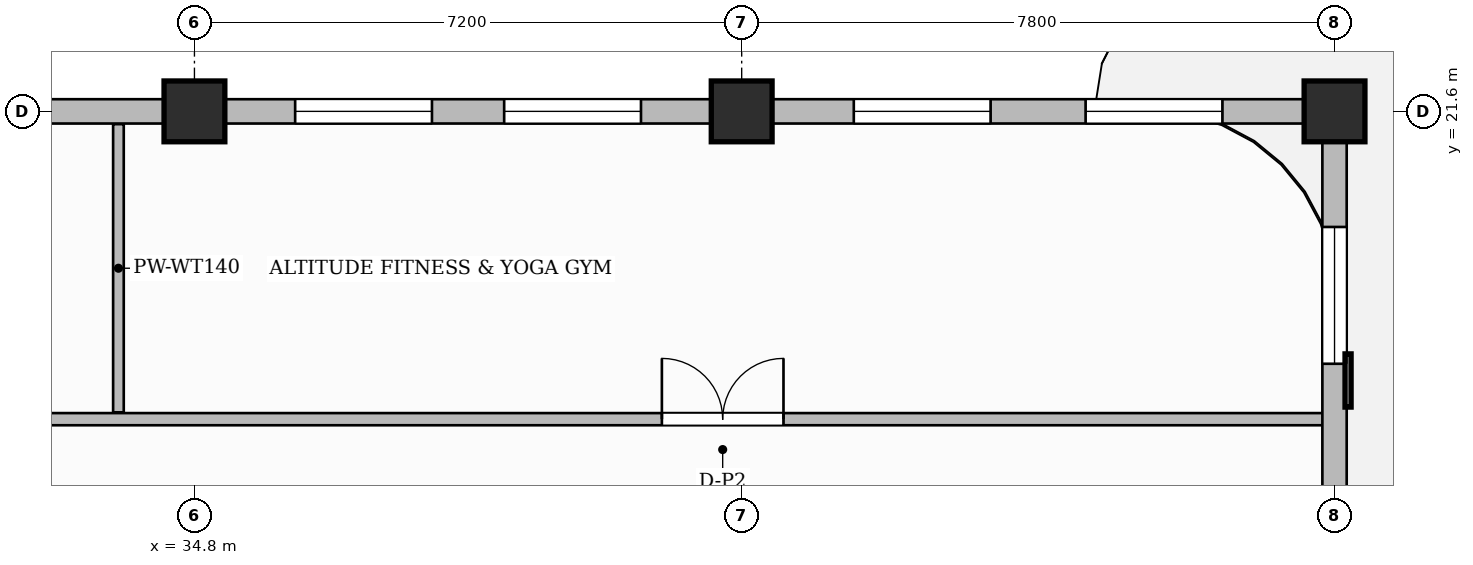
"""IFC4 building model, lengths in metres.
Left out: names, types, materials, properties, quantities, classifications, styles, units other than length and angle.
Written with IfcOpenShell. Run it as: python <this file> out.ifc"""

import sys

from ifc_helpers import new_model, si_unit, direction, frame, frame_2d, origin, origin_2d, place, context, subcontext, project, spatial, rectangle, extrude, source, transform, mapped, element, fill, save


model = new_model("IFC4")
c1 = context("Model", 3, precision=1e-05, world=origin(), true_north=direction((0.0, 1.0)))
c2 = subcontext(c1, "Body", "Model", "MODEL_VIEW")
j1 = project(units=[si_unit("LENGTHUNIT", "METRE"), si_unit("PLANEANGLEUNIT", "RADIAN")], contexts=[c1])
p1 = place(None, origin())
s1 = spatial("IfcSite", under=j1, at=p1, CompositionType="ELEMENT")
p2 = place(p1, origin())
s2 = spatial("IfcBuilding", under=s1, at=p2, CompositionType="ELEMENT")
p3 = place(p2, frame((0.0, 0.0, 271.2)))
s3 = spatial("IfcBuildingStorey", under=s2, at=p3, CompositionType="ELEMENT", Elevation=271.2)
m1 = source(origin(), c2, "Body", "SweptSolid", [
    extrude(rectangle(XDim=0.8, YDim=0.8, at=origin_2d()), origin(), (0.0, 0.0, 1.0), 3.85),
])
for number, where, z_axis, x_axis in (
    (1, (34.8, 21.6, 0.0), (0.0, 0.0, 1.0), (1.0, 0.0, 0.0)),
    (2, (42.0, 21.6, 0.0), (0.0, 0.0, 1.0), (1.0, 0.0, 0.0)),
    (3, (49.8, 21.6, 0.0), (0.0, 0.0, 1.0), (1.0, 0.0, 0.0)),
):
    element("IfcColumn", number, at=place(p3, frame(where, z_axis=z_axis, x_axis=x_axis)), inside=s3, PredefinedType="COLUMN", context=c2, shape_type="MappedRepresentation", body=[
        mapped(m1, transform((0.0, 0.0, 0.0), scale=1.0)),
    ])
p4 = place(p3, frame((30.29, 17.55, 0.0), z_axis=(0.0, 0.0, 1.0), x_axis=(1.0, 0.0, 0.0)))
e4 = element("IfcWall", 4, at=p4, inside=s3, PredefinedType="PARTITIONING", context=c2, shape_type="SweptSolid", body=[
    extrude(rectangle(XDim=19.37, YDim=0.16, at=frame_2d((9.685, 0.0))), origin(), (0.0, 0.0, 1.0), 3.6),
])
p5 = place(p4, frame((1.285, 0.0, 0.0)))
e5 = element("IfcOpeningElement", 5, at=p5, cuts=e4, PredefinedType="OPENING", context=c2, shape_type="SweptSolid", body=[
    extrude(rectangle(XDim=0.85, YDim=2.1, at=frame_2d((0.425, 1.05))), frame((0.0, 0.09, 0.0), z_axis=(0.0, -1.0, 0.0), x_axis=(1.0, 0.0, 0.0)), (0.0, 0.0, 1.0), 0.18),
])
p6 = place(p4, frame((10.66, 0.0, 0.0)))
e6 = element("IfcOpeningElement", 6, at=p6, cuts=e4, PredefinedType="OPENING", context=c2, shape_type="SweptSolid", body=[
    extrude(rectangle(XDim=1.6, YDim=2.4, at=frame_2d((0.8, 1.2))), frame((0.0, 0.09, 0.0), z_axis=(0.0, -1.0, 0.0), x_axis=(1.0, 0.0, 0.0)), (0.0, 0.0, 1.0), 0.18),
])
p7 = place(p3, frame((33.8, 17.64, 0.0), z_axis=(0.0, 0.0, 1.0), x_axis=(0.0, 1.0, 0.0)))
e7 = element("IfcWall", 7, at=p7, inside=s3, PredefinedType="PARTITIONING", context=c2, shape_type="SweptSolid", body=[
    extrude(rectangle(XDim=3.792, YDim=0.14, at=frame_2d((1.896, 0.0))), origin(), (0.0, 0.0, 1.0), 3.6),
])
p8 = place(p3, frame((49.8, 14.62, 0.0), z_axis=(0.0, 0.0, 1.0), x_axis=(0.0, 1.0, 0.0)))
e8 = element("IfcWall", 8, at=p8, inside=s3, PredefinedType="SOLIDWALL", context=c2, shape_type="SweptSolid", body=[
    extrude(rectangle(XDim=6.93, YDim=0.32, at=frame_2d((3.465, 0.0))), origin(), (0.0, 0.0, 1.0), 3.185),
])
p9 = place(p8, frame((0.42, 0.0, 0.0)))
e9 = element("IfcOpeningElement", 9, at=p9, cuts=e8, PredefinedType="OPENING", context=c2, shape_type="SweptSolid", body=[
    extrude(rectangle(XDim=1.2, YDim=2.2, at=frame_2d((0.6, 1.1))), frame((0.0, 0.17, 0.0), z_axis=(0.0, -1.0, 0.0), x_axis=(1.0, 0.0, 0.0)), (0.0, 0.0, 1.0), 0.34),
])
p10 = place(p8, frame((3.659, 0.0, 0.8)))
e10 = element("IfcOpeningElement", 10, at=p10, cuts=e8, PredefinedType="OPENING", context=c2, shape_type="SweptSolid", body=[
    extrude(rectangle(XDim=1.8, YDim=1.85, at=frame_2d((0.9, 0.925))), frame((0.0, 0.17, 0.0), z_axis=(0.0, -1.0, 0.0), x_axis=(1.0, 0.0, 0.0)), (0.0, 0.0, 1.0), 0.34),
])
p11 = place(p3, frame((18.0, 21.6, 0.0), z_axis=(0.0, 0.0, 1.0), x_axis=(1.0, 0.0, 0.0)))
e11 = element("IfcWall", 11, at=p11, inside=s3, PredefinedType="SOLIDWALL", context=c2, shape_type="SweptSolid", body=[
    extrude(rectangle(XDim=31.8, YDim=0.32, at=frame_2d((15.9, 0.0))), origin(), (0.0, 0.0, 1.0), 3.185),
])
p12 = place(p11, frame((0.42, 0.0, 0.0)))
e12 = element("IfcOpeningElement", 12, at=p12, cuts=e11, PredefinedType="OPENING", context=c2, shape_type="SweptSolid", body=[
    extrude(rectangle(XDim=1.2, YDim=2.2, at=frame_2d((0.6, 1.1))), frame((0.0, 0.17, 0.0), z_axis=(0.0, -1.0, 0.0), x_axis=(1.0, 0.0, 0.0)), (0.0, 0.0, 1.0), 0.34),
])
p13 = place(p11, frame((4.581, 0.0, 0.8)))
e13 = element("IfcOpeningElement", 13, at=p13, cuts=e11, PredefinedType="OPENING", context=c2, shape_type="SweptSolid", body=[
    extrude(rectangle(XDim=0.95, YDim=1.75, at=frame_2d((0.475, 0.875))), frame((0.0, 0.17, 0.0), z_axis=(0.0, -1.0, 0.0), x_axis=(1.0, 0.0, 0.0)), (0.0, 0.0, 1.0), 0.34),
])
p14 = place(p11, frame((6.3, 0.0, 0.8)))
e14 = element("IfcOpeningElement", 14, at=p14, cuts=e11, PredefinedType="OPENING", context=c2, shape_type="SweptSolid", body=[
    extrude(rectangle(XDim=1.8, YDim=1.85, at=frame_2d((0.9, 0.925))), frame((0.0, 0.17, 0.0), z_axis=(0.0, -1.0, 0.0), x_axis=(1.0, 0.0, 0.0)), (0.0, 0.0, 1.0), 0.34),
])
p15 = place(p11, frame((8.869, 0.0, 0.8)))
e15 = element("IfcOpeningElement", 15, at=p15, cuts=e11, PredefinedType="OPENING", context=c2, shape_type="SweptSolid", body=[
    extrude(rectangle(XDim=0.95, YDim=1.75, at=frame_2d((0.475, 0.875))), frame((0.0, 0.17, 0.0), z_axis=(0.0, -1.0, 0.0), x_axis=(1.0, 0.0, 0.0)), (0.0, 0.0, 1.0), 0.34),
])
p16 = place(p11, frame((13.101, 0.0, 0.8)))
e16 = element("IfcOpeningElement", 16, at=p16, cuts=e11, PredefinedType="OPENING", context=c2, shape_type="SweptSolid", body=[
    extrude(rectangle(XDim=1.8, YDim=1.85, at=frame_2d((0.9, 0.925))), frame((0.0, 0.17, 0.0), z_axis=(0.0, -1.0, 0.0), x_axis=(1.0, 0.0, 0.0)), (0.0, 0.0, 1.0), 0.34),
])
p17 = place(p11, frame((18.125, 0.0, 0.8)))
e17 = element("IfcOpeningElement", 17, at=p17, cuts=e11, PredefinedType="OPENING", context=c2, shape_type="SweptSolid", body=[
    extrude(rectangle(XDim=1.8, YDim=1.85, at=frame_2d((0.9, 0.925))), frame((0.0, 0.17, 0.0), z_axis=(0.0, -1.0, 0.0), x_axis=(1.0, 0.0, 0.0)), (0.0, 0.0, 1.0), 0.34),
])
p18 = place(p11, frame((20.875, 0.0, 0.8)))
e18 = element("IfcOpeningElement", 18, at=p18, cuts=e11, PredefinedType="OPENING", context=c2, shape_type="SweptSolid", body=[
    extrude(rectangle(XDim=1.8, YDim=1.85, at=frame_2d((0.9, 0.925))), frame((0.0, 0.17, 0.0), z_axis=(0.0, -1.0, 0.0), x_axis=(1.0, 0.0, 0.0)), (0.0, 0.0, 1.0), 0.34),
])
p19 = place(p11, frame((25.475, 0.0, 0.8)))
e19 = element("IfcOpeningElement", 19, at=p19, cuts=e11, PredefinedType="OPENING", context=c2, shape_type="SweptSolid", body=[
    extrude(rectangle(XDim=1.8, YDim=1.85, at=frame_2d((0.9, 0.925))), frame((0.0, 0.17, 0.0), z_axis=(0.0, -1.0, 0.0), x_axis=(1.0, 0.0, 0.0)), (0.0, 0.0, 1.0), 0.34),
])
p20 = place(p11, frame((28.525, 0.0, 0.8)))
e20 = element("IfcOpeningElement", 20, at=p20, cuts=e11, PredefinedType="OPENING", context=c2, shape_type="SweptSolid", body=[
    extrude(rectangle(XDim=1.8, YDim=1.85, at=frame_2d((0.9, 0.925))), frame((0.0, 0.17, 0.0), z_axis=(0.0, -1.0, 0.0), x_axis=(1.0, 0.0, 0.0)), (0.0, 0.0, 1.0), 0.34),
])
m2 = source(origin(), c2, "Body", "SweptSolid", [
    extrude(rectangle(XDim=1.6, YDim=2.4, at=frame_2d((0.8, 1.2))), frame((0.0, 0.025, 0.0), z_axis=(0.0, -1.0, 0.0), x_axis=(1.0, 0.0, 0.0)), (0.0, 0.0, 1.0), 0.05),
])
p21 = place(p6, origin())
e21 = element("IfcDoor", 21, at=p21, inside=s3, OperationType="DOUBLE_DOOR_SINGLE_SWING", PredefinedType="DOOR", context=c2, shape_type="MappedRepresentation", body=[
    mapped(m2, transform((0.0, 0.0, 0.0), scale=1.0)),
])
fill(e6, e21)
m3 = source(origin(), c2, "Body", "SweptSolid", [
    extrude(rectangle(XDim=1.8, YDim=1.85, at=frame_2d((0.9, 0.925))), frame((0.0, 0.03, 0.0), z_axis=(0.0, -1.0, 0.0), x_axis=(1.0, 0.0, 0.0)), (0.0, 0.0, 1.0), 0.06),
])
p22 = place(p10, origin())
e22 = element("IfcWindow", 22, at=p22, inside=s3, PartitioningType="DOUBLE_PANEL_VERTICAL", PredefinedType="WINDOW", context=c2, shape_type="MappedRepresentation", body=[
    mapped(m3, transform((0.0, 0.0, 0.0), scale=1.0)),
])
fill(e10, e22)
p23 = place(p17, origin())
e23 = element("IfcWindow", 23, at=p23, inside=s3, PartitioningType="DOUBLE_PANEL_VERTICAL", PredefinedType="WINDOW", context=c2, shape_type="MappedRepresentation", body=[
    mapped(m3, transform((0.0, 0.0, 0.0), scale=1.0)),
])
fill(e17, e23)
p24 = place(p18, origin())
e24 = element("IfcWindow", 24, at=p24, inside=s3, PartitioningType="DOUBLE_PANEL_VERTICAL", PredefinedType="WINDOW", context=c2, shape_type="MappedRepresentation", body=[
    mapped(m3, transform((0.0, 0.0, 0.0), scale=1.0)),
])
fill(e18, e24)
p25 = place(p19, origin())
e25 = element("IfcWindow", 25, at=p25, inside=s3, PartitioningType="DOUBLE_PANEL_VERTICAL", PredefinedType="WINDOW", context=c2, shape_type="MappedRepresentation", body=[
    mapped(m3, transform((0.0, 0.0, 0.0), scale=1.0)),
])
fill(e19, e25)
p26 = place(p20, origin())
e26 = element("IfcWindow", 26, at=p26, inside=s3, PartitioningType="DOUBLE_PANEL_VERTICAL", PredefinedType="WINDOW", context=c2, shape_type="MappedRepresentation", body=[
    mapped(m3, transform((0.0, 0.0, 0.0), scale=1.0)),
])
fill(e20, e26)
save(model, sys.argv[1])
